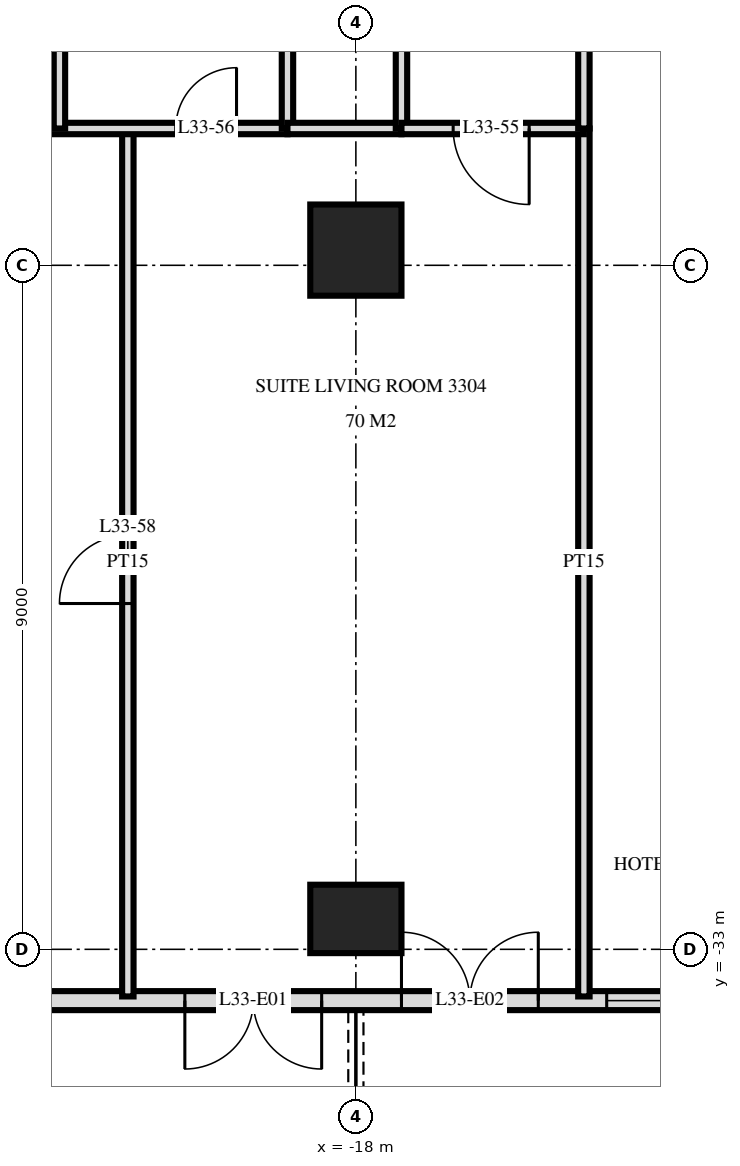
"""IFC4 building model, lengths in metres.
Left out: names, types, materials, properties, quantities, classifications, styles, units other than length and angle.
Written with IfcOpenShell. Run it as: python <this file> out.ifc"""

import sys

from ifc_helpers import new_model, si_unit, direction, frame, frame_2d, origin, origin_2d, place, context, subcontext, project, spatial, rectangle, extrude, element, fill, save


model = new_model("IFC4")
c1 = context("Model", 3, precision=1e-05, world=origin(), true_north=direction((0.0, 1.0)))
c2 = subcontext(c1, "Body", "Model", "MODEL_VIEW")
j1 = project(units=[si_unit("LENGTHUNIT", "METRE"), si_unit("PLANEANGLEUNIT", "RADIAN")], contexts=[c1])
p1 = place(None, origin())
s1 = spatial("IfcSite", under=j1, at=p1, CompositionType="ELEMENT")
p2 = place(p1, origin())
s2 = spatial("IfcBuilding", under=s1, at=p2, CompositionType="ELEMENT")
p3 = place(p2, frame((0.0, 0.0, 130.8)))
s3 = spatial("IfcBuildingStorey", under=s2, at=p3, CompositionType="ELEMENT", Elevation=130.8)
p4 = place(p3, frame((-18.0, -32.6, 0.0), z_axis=(0.0, 0.0, 1.0), x_axis=(1.0, 0.0, 0.0)))
e1 = element("IfcColumn", 1, at=p4, inside=s3, PredefinedType="COLUMN", context=c2, shape_type="SweptSolid", body=[
    extrude(rectangle(XDim=1.2, YDim=0.9, at=origin_2d()), origin(), (0.0, 0.0, 1.0), 3.6),
])
p5 = place(p3, frame((-18.0, -23.8, 0.0), z_axis=(0.0, 0.0, 1.0), x_axis=(1.0, 0.0, 0.0)))
e2 = element("IfcColumn", 2, at=p5, inside=s3, PredefinedType="COLUMN", context=c2, shape_type="SweptSolid", body=[
    extrude(rectangle(XDim=1.2, YDim=1.2, at=origin_2d()), origin(), (0.0, 0.0, 1.0), 3.6),
])
p6 = place(p3, frame((-23.675, -33.675, 0.0), z_axis=(0.0, 0.0, 1.0), x_axis=(1.0, 0.0, 0.0)))
e3 = element("IfcWall", 3, at=p6, inside=s3, PredefinedType="SOLIDWALL", context=c2, shape_type="SweptSolid", body=[
    extrude(rectangle(XDim=47.351, YDim=0.25, at=frame_2d((23.675, 0.0))), origin(), (0.0, 0.0, 1.0), 3.32),
])
p7 = place(p6, frame((3.425, 0.0, 0.0)))
e4 = element("IfcOpeningElement", 4, at=p7, cuts=e3, PredefinedType="OPENING", context=c2, shape_type="SweptSolid", body=[
    extrude(rectangle(XDim=1.8, YDim=2.4, at=frame_2d((0.9, 1.2))), frame((0.0, 0.135, 0.0), z_axis=(0.0, -1.0, 0.0), x_axis=(1.0, 0.0, 0.0)), (0.0, 0.0, 1.0), 0.27),
])
p8 = place(p6, frame((6.275, 0.0, 0.0)))
e5 = element("IfcOpeningElement", 5, at=p8, cuts=e3, PredefinedType="OPENING", context=c2, shape_type="SweptSolid", body=[
    extrude(rectangle(XDim=1.8, YDim=2.4, at=frame_2d((0.9, 1.2))), frame((0.0, 0.135, 0.0), z_axis=(0.0, -1.0, 0.0), x_axis=(1.0, 0.0, 0.0)), (0.0, 0.0, 1.0), 0.27),
])
p9 = place(p6, frame((8.975, 0.0, 0.3)))
e6 = element("IfcOpeningElement", 6, at=p9, cuts=e3, PredefinedType="OPENING", context=c2, shape_type="SweptSolid", body=[
    extrude(rectangle(XDim=2.4, YDim=2.1, at=frame_2d((1.2, 1.05))), frame((0.0, 0.135, 0.0), z_axis=(0.0, -1.0, 0.0), x_axis=(1.0, 0.0, 0.0)), (0.0, 0.0, 1.0), 0.27),
])
p10 = place(p6, frame((12.275, 0.0, 0.0)))
e7 = element("IfcOpeningElement", 7, at=p10, cuts=e3, PredefinedType="OPENING", context=c2, shape_type="SweptSolid", body=[
    extrude(rectangle(XDim=1.8, YDim=2.4, at=frame_2d((0.9, 1.2))), frame((0.0, 0.135, 0.0), z_axis=(0.0, -1.0, 0.0), x_axis=(1.0, 0.0, 0.0)), (0.0, 0.0, 1.0), 0.27),
])
p11 = place(p6, frame((14.975, 0.0, 0.3)))
e8 = element("IfcOpeningElement", 8, at=p11, cuts=e3, PredefinedType="OPENING", context=c2, shape_type="SweptSolid", body=[
    extrude(rectangle(XDim=2.4, YDim=2.1, at=frame_2d((1.2, 1.05))), frame((0.0, 0.135, 0.0), z_axis=(0.0, -1.0, 0.0), x_axis=(1.0, 0.0, 0.0)), (0.0, 0.0, 1.0), 0.27),
])
p12 = place(p6, frame((17.975, 0.0, 0.3)))
e9 = element("IfcOpeningElement", 9, at=p12, cuts=e3, PredefinedType="OPENING", context=c2, shape_type="SweptSolid", body=[
    extrude(rectangle(XDim=2.4, YDim=2.1, at=frame_2d((1.2, 1.05))), frame((0.0, 0.135, 0.0), z_axis=(0.0, -1.0, 0.0), x_axis=(1.0, 0.0, 0.0)), (0.0, 0.0, 1.0), 0.27),
])
p13 = place(p6, frame((21.275, 0.0, 0.0)))
e10 = element("IfcOpeningElement", 10, at=p13, cuts=e3, PredefinedType="OPENING", context=c2, shape_type="SweptSolid", body=[
    extrude(rectangle(XDim=1.8, YDim=2.4, at=frame_2d((0.9, 1.2))), frame((0.0, 0.135, 0.0), z_axis=(0.0, -1.0, 0.0), x_axis=(1.0, 0.0, 0.0)), (0.0, 0.0, 1.0), 0.27),
])
p14 = place(p6, frame((24.275, 0.0, 0.0)))
e11 = element("IfcOpeningElement", 11, at=p14, cuts=e3, PredefinedType="OPENING", context=c2, shape_type="SweptSolid", body=[
    extrude(rectangle(XDim=1.8, YDim=2.4, at=frame_2d((0.9, 1.2))), frame((0.0, 0.135, 0.0), z_axis=(0.0, -1.0, 0.0), x_axis=(1.0, 0.0, 0.0)), (0.0, 0.0, 1.0), 0.27),
])
p15 = place(p6, frame((26.975, 0.0, 0.3)))
e12 = element("IfcOpeningElement", 12, at=p15, cuts=e3, PredefinedType="OPENING", context=c2, shape_type="SweptSolid", body=[
    extrude(rectangle(XDim=2.4, YDim=2.1, at=frame_2d((1.2, 1.05))), frame((0.0, 0.135, 0.0), z_axis=(0.0, -1.0, 0.0), x_axis=(1.0, 0.0, 0.0)), (0.0, 0.0, 1.0), 0.27),
])
p16 = place(p6, frame((30.275, 0.0, 0.0)))
e13 = element("IfcOpeningElement", 13, at=p16, cuts=e3, PredefinedType="OPENING", context=c2, shape_type="SweptSolid", body=[
    extrude(rectangle(XDim=1.8, YDim=2.4, at=frame_2d((0.9, 1.2))), frame((0.0, 0.135, 0.0), z_axis=(0.0, -1.0, 0.0), x_axis=(1.0, 0.0, 0.0)), (0.0, 0.0, 1.0), 0.27),
])
p17 = place(p6, frame((32.975, 0.0, 0.3)))
e14 = element("IfcOpeningElement", 14, at=p17, cuts=e3, PredefinedType="OPENING", context=c2, shape_type="SweptSolid", body=[
    extrude(rectangle(XDim=2.4, YDim=2.1, at=frame_2d((1.2, 1.05))), frame((0.0, 0.135, 0.0), z_axis=(0.0, -1.0, 0.0), x_axis=(1.0, 0.0, 0.0)), (0.0, 0.0, 1.0), 0.27),
])
p18 = place(p6, frame((36.275, 0.0, 0.0)))
e15 = element("IfcOpeningElement", 15, at=p18, cuts=e3, PredefinedType="OPENING", context=c2, shape_type="SweptSolid", body=[
    extrude(rectangle(XDim=1.8, YDim=2.4, at=frame_2d((0.9, 1.2))), frame((0.0, 0.135, 0.0), z_axis=(0.0, -1.0, 0.0), x_axis=(1.0, 0.0, 0.0)), (0.0, 0.0, 1.0), 0.27),
])
p19 = place(p6, frame((38.975, 0.0, 0.3)))
e16 = element("IfcOpeningElement", 16, at=p19, cuts=e3, PredefinedType="OPENING", context=c2, shape_type="SweptSolid", body=[
    extrude(rectangle(XDim=2.4, YDim=2.1, at=frame_2d((1.2, 1.05))), frame((0.0, 0.135, 0.0), z_axis=(0.0, -1.0, 0.0), x_axis=(1.0, 0.0, 0.0)), (0.0, 0.0, 1.0), 0.27),
])
p20 = place(p6, frame((41.975, 0.0, 0.3)))
e17 = element("IfcOpeningElement", 17, at=p20, cuts=e3, PredefinedType="OPENING", context=c2, shape_type="SweptSolid", body=[
    extrude(rectangle(XDim=2.4, YDim=2.1, at=frame_2d((1.2, 1.05))), frame((0.0, 0.135, 0.0), z_axis=(0.0, -1.0, 0.0), x_axis=(1.0, 0.0, 0.0)), (0.0, 0.0, 1.0), 0.27),
])
p21 = place(p6, frame((45.125, 0.0, 0.0)))
e18 = element("IfcOpeningElement", 18, at=p21, cuts=e3, PredefinedType="OPENING", context=c2, shape_type="SweptSolid", body=[
    extrude(rectangle(XDim=1.8, YDim=2.4, at=frame_2d((0.9, 1.2))), frame((0.0, 0.135, 0.0), z_axis=(0.0, -1.0, 0.0), x_axis=(1.0, 0.0, 0.0)), (0.0, 0.0, 1.0), 0.27),
])
p22 = place(p3, frame((-15.0, -22.2, 0.0), z_axis=(0.0, 0.0, 1.0), x_axis=(0.0, 1.0, 0.0)))
e19 = element("IfcWall", 19, at=p22, inside=s3, PredefinedType="PARTITIONING", context=c2, shape_type="SweptSolid", body=[
    extrude(rectangle(XDim=4.2, YDim=0.15, at=frame_2d((2.1, 0.0))), origin(), (0.0, 0.0, 1.0), 3.32),
])
p23 = place(p3, frame((-15.0, -33.62, 0.0), z_axis=(0.0, 0.0, 1.0), x_axis=(0.0, 1.0, 0.0)))
e20 = element("IfcWall", 20, at=p23, inside=s3, PredefinedType="PARTITIONING", context=c2, shape_type="SweptSolid", body=[
    extrude(rectangle(XDim=11.42, YDim=0.15, at=frame_2d((5.71, 0.0))), origin(), (0.0, 0.0, 1.0), 3.32),
])
p24 = place(p3, frame((-17.4, -22.2, 0.0), z_axis=(0.0, 0.0, 1.0), x_axis=(0.0, 1.0, 0.0)))
e21 = element("IfcWall", 21, at=p24, inside=s3, PredefinedType="PARTITIONING", context=c2, shape_type="SweptSolid", body=[
    extrude(rectangle(XDim=4.2, YDim=0.15, at=frame_2d((2.1, 0.0))), origin(), (0.0, 0.0, 1.0), 3.32),
])
p25 = place(p24, frame((1.58, 0.0, 0.0)))
e22 = element("IfcOpeningElement", 22, at=p25, cuts=e21, PredefinedType="OPENING", context=c2, shape_type="SweptSolid", body=[
    extrude(rectangle(XDim=1.0, YDim=2.1, at=frame_2d((0.5, 1.05))), frame((0.0, 0.085, 0.0), z_axis=(0.0, -1.0, 0.0), x_axis=(1.0, 0.0, 0.0)), (0.0, 0.0, 1.0), 0.17),
])
p26 = place(p3, frame((-18.9, -22.2, 0.0), z_axis=(0.0, 0.0, 1.0), x_axis=(0.0, 1.0, 0.0)))
e23 = element("IfcWall", 23, at=p26, inside=s3, PredefinedType="PLUMBINGWALL", context=c2, shape_type="SweptSolid", body=[
    extrude(rectangle(XDim=4.2, YDim=0.15, at=frame_2d((2.1, 0.0))), origin(), (0.0, 0.0, 1.0), 3.32),
])
p27 = place(p3, frame((-21.0, -33.62, 0.0), z_axis=(0.0, 0.0, 1.0), x_axis=(0.0, 1.0, 0.0)))
e24 = element("IfcWall", 24, at=p27, inside=s3, PredefinedType="PARTITIONING", context=c2, shape_type="SweptSolid", body=[
    extrude(rectangle(XDim=11.42, YDim=0.15, at=frame_2d((5.71, 0.0))), origin(), (0.0, 0.0, 1.0), 3.32),
])
p28 = place(p27, frame((5.17, 0.0, 0.0)))
e25 = element("IfcOpeningElement", 25, at=p28, cuts=e24, PredefinedType="OPENING", context=c2, shape_type="SweptSolid", body=[
    extrude(rectangle(XDim=0.9, YDim=2.1, at=frame_2d((0.45, 1.05))), frame((0.0, 0.085, 0.0), z_axis=(0.0, -1.0, 0.0), x_axis=(1.0, 0.0, 0.0)), (0.0, 0.0, 1.0), 0.17),
])
p29 = place(p3, frame((-21.9, -22.2, 0.0), z_axis=(0.0, 0.0, 1.0), x_axis=(0.0, 1.0, 0.0)))
e26 = element("IfcWall", 26, at=p29, inside=s3, PredefinedType="PARTITIONING", context=c2, shape_type="SweptSolid", body=[
    extrude(rectangle(XDim=4.2, YDim=0.15, at=frame_2d((2.1, 0.0))), origin(), (0.0, 0.0, 1.0), 3.32),
])
p30 = place(p3, frame((-17.4, -22.2, 0.0), z_axis=(0.0, 0.0, 1.0), x_axis=(1.0, 0.0, 0.0)))
e27 = element("IfcWall", 27, at=p30, inside=s3, PredefinedType="PARTITIONING", context=c2, shape_type="SweptSolid", body=[
    extrude(rectangle(XDim=2.4, YDim=0.15, at=frame_2d((1.2, 0.0))), origin(), (0.0, 0.0, 1.0), 3.32),
])
p31 = place(p30, frame((0.68, 0.0, 0.0)))
e28 = element("IfcOpeningElement", 28, at=p31, cuts=e27, PredefinedType="OPENING", context=c2, shape_type="SweptSolid", body=[
    extrude(rectangle(XDim=1.0, YDim=2.1, at=frame_2d((0.5, 1.05))), frame((0.0, 0.085, 0.0), z_axis=(0.0, -1.0, 0.0), x_axis=(1.0, 0.0, 0.0)), (0.0, 0.0, 1.0), 0.17),
])
p32 = place(p3, frame((-28.02, -22.2, 0.0), z_axis=(0.0, 0.0, 1.0), x_axis=(1.0, 0.0, 0.0)))
e29 = element("IfcWall", 29, at=p32, inside=s3, PredefinedType="PARTITIONING", context=c2, shape_type="SweptSolid", body=[
    extrude(rectangle(XDim=9.12, YDim=0.15, at=frame_2d((4.56, 0.0))), origin(), (0.0, 0.0, 1.0), 3.32),
])
p33 = place(p32, frame((7.65, 0.0, 0.0)))
e30 = element("IfcOpeningElement", 30, at=p33, cuts=e29, PredefinedType="OPENING", context=c2, shape_type="SweptSolid", body=[
    extrude(rectangle(XDim=0.8, YDim=2.1, at=frame_2d((0.4, 1.05))), frame((0.0, 0.085, 0.0), z_axis=(0.0, -1.0, 0.0), x_axis=(1.0, 0.0, 0.0)), (0.0, 0.0, 1.0), 0.17),
])
p34 = place(p32, frame((2.5, 0.0, 0.0)))
e31 = element("IfcOpeningElement", 31, at=p34, cuts=e29, PredefinedType="OPENING", context=c2, shape_type="SweptSolid", body=[
    extrude(rectangle(XDim=0.9, YDim=2.1, at=frame_2d((0.45, 1.05))), frame((0.0, 0.085, 0.0), z_axis=(0.0, -1.0, 0.0), x_axis=(1.0, 0.0, 0.0)), (0.0, 0.0, 1.0), 0.17),
])
p35 = place(p3, frame((-18.9, -22.2, 0.0), z_axis=(0.0, 0.0, 1.0), x_axis=(1.0, 0.0, 0.0)))
e32 = element("IfcWall", 32, at=p35, inside=s3, PredefinedType="PLUMBINGWALL", context=c2, shape_type="SweptSolid", body=[
    extrude(rectangle(XDim=1.5, YDim=0.15, at=frame_2d((0.75, 0.0))), origin(), (0.0, 0.0, 1.0), 3.32),
])
p36 = place(p7, frame((0.9, 0.0, 0.0), z_axis=(0.0, 0.0, 1.0), x_axis=(-1.0, 0.0, 0.0)))
e33 = element("IfcDoor", 33, at=p36, inside=s3, OperationType="DOUBLE_DOOR_SINGLE_SWING", PredefinedType="DOOR", context=c2, shape_type="SweptSolid", body=[
    extrude(rectangle(XDim=1.8, YDim=2.4, at=frame_2d((0.0, 1.2))), frame((0.0, -0.025, 0.0), z_axis=(0.0, 1.0, 0.0), x_axis=(-1.0, 0.0, 0.0)), (0.0, 0.0, 1.0), 0.05),
])
fill(e4, e33)
p37 = place(p8, origin())
e34 = element("IfcDoor", 34, at=p37, inside=s3, OperationType="DOUBLE_DOOR_SINGLE_SWING", PredefinedType="DOOR", context=c2, shape_type="SweptSolid", body=[
    extrude(rectangle(XDim=1.8, YDim=2.4, at=frame_2d((0.9, 1.2))), frame((0.0, 0.025, 0.0), z_axis=(0.0, -1.0, 0.0), x_axis=(1.0, 0.0, 0.0)), (0.0, 0.0, 1.0), 0.05),
])
fill(e5, e34)
p38 = place(p9, origin())
e35 = element("IfcWindow", 35, at=p38, inside=s3, PartitioningType="SINGLE_PANEL", PredefinedType="WINDOW", context=c2, shape_type="SweptSolid", body=[
    extrude(rectangle(XDim=2.4, YDim=2.1, at=frame_2d((1.2, 1.05))), frame((0.0, 0.03, 0.0), z_axis=(0.0, -1.0, 0.0), x_axis=(1.0, 0.0, 0.0)), (0.0, 0.0, 1.0), 0.06),
])
fill(e6, e35)
p39 = place(p31, frame((0.5, 0.0, 0.0), z_axis=(0.0, 0.0, 1.0), x_axis=(-1.0, 0.0, 0.0)))
e36 = element("IfcDoor", 36, at=p39, inside=s3, OperationType="SINGLE_SWING_RIGHT", PredefinedType="DOOR", context=c2, shape_type="SweptSolid", body=[
    extrude(rectangle(XDim=1.0, YDim=2.1, at=frame_2d((0.0, 1.05))), frame((0.0, -0.025, 0.0), z_axis=(0.0, 1.0, 0.0), x_axis=(-1.0, 0.0, 0.0)), (0.0, 0.0, 1.0), 0.05),
])
fill(e28, e36)
p40 = place(p33, origin())
e37 = element("IfcDoor", 37, at=p40, inside=s3, OperationType="SINGLE_SWING_LEFT", PredefinedType="DOOR", context=c2, shape_type="SweptSolid", body=[
    extrude(rectangle(XDim=0.8, YDim=2.1, at=frame_2d((0.4, 1.05))), frame((0.0, 0.025, 0.0), z_axis=(0.0, -1.0, 0.0), x_axis=(1.0, 0.0, 0.0)), (0.0, 0.0, 1.0), 0.05),
])
fill(e30, e37)
p41 = place(p28, origin())
e38 = element("IfcDoor", 38, at=p41, inside=s3, OperationType="SINGLE_SWING_RIGHT", PredefinedType="DOOR", context=c2, shape_type="SweptSolid", body=[
    extrude(rectangle(XDim=0.9, YDim=2.1, at=frame_2d((0.45, 1.05))), frame((0.0, 0.025, 0.0), z_axis=(0.0, -1.0, 0.0), x_axis=(1.0, 0.0, 0.0)), (0.0, 0.0, 1.0), 0.05),
])
fill(e25, e38)
save(model, sys.argv[1])
